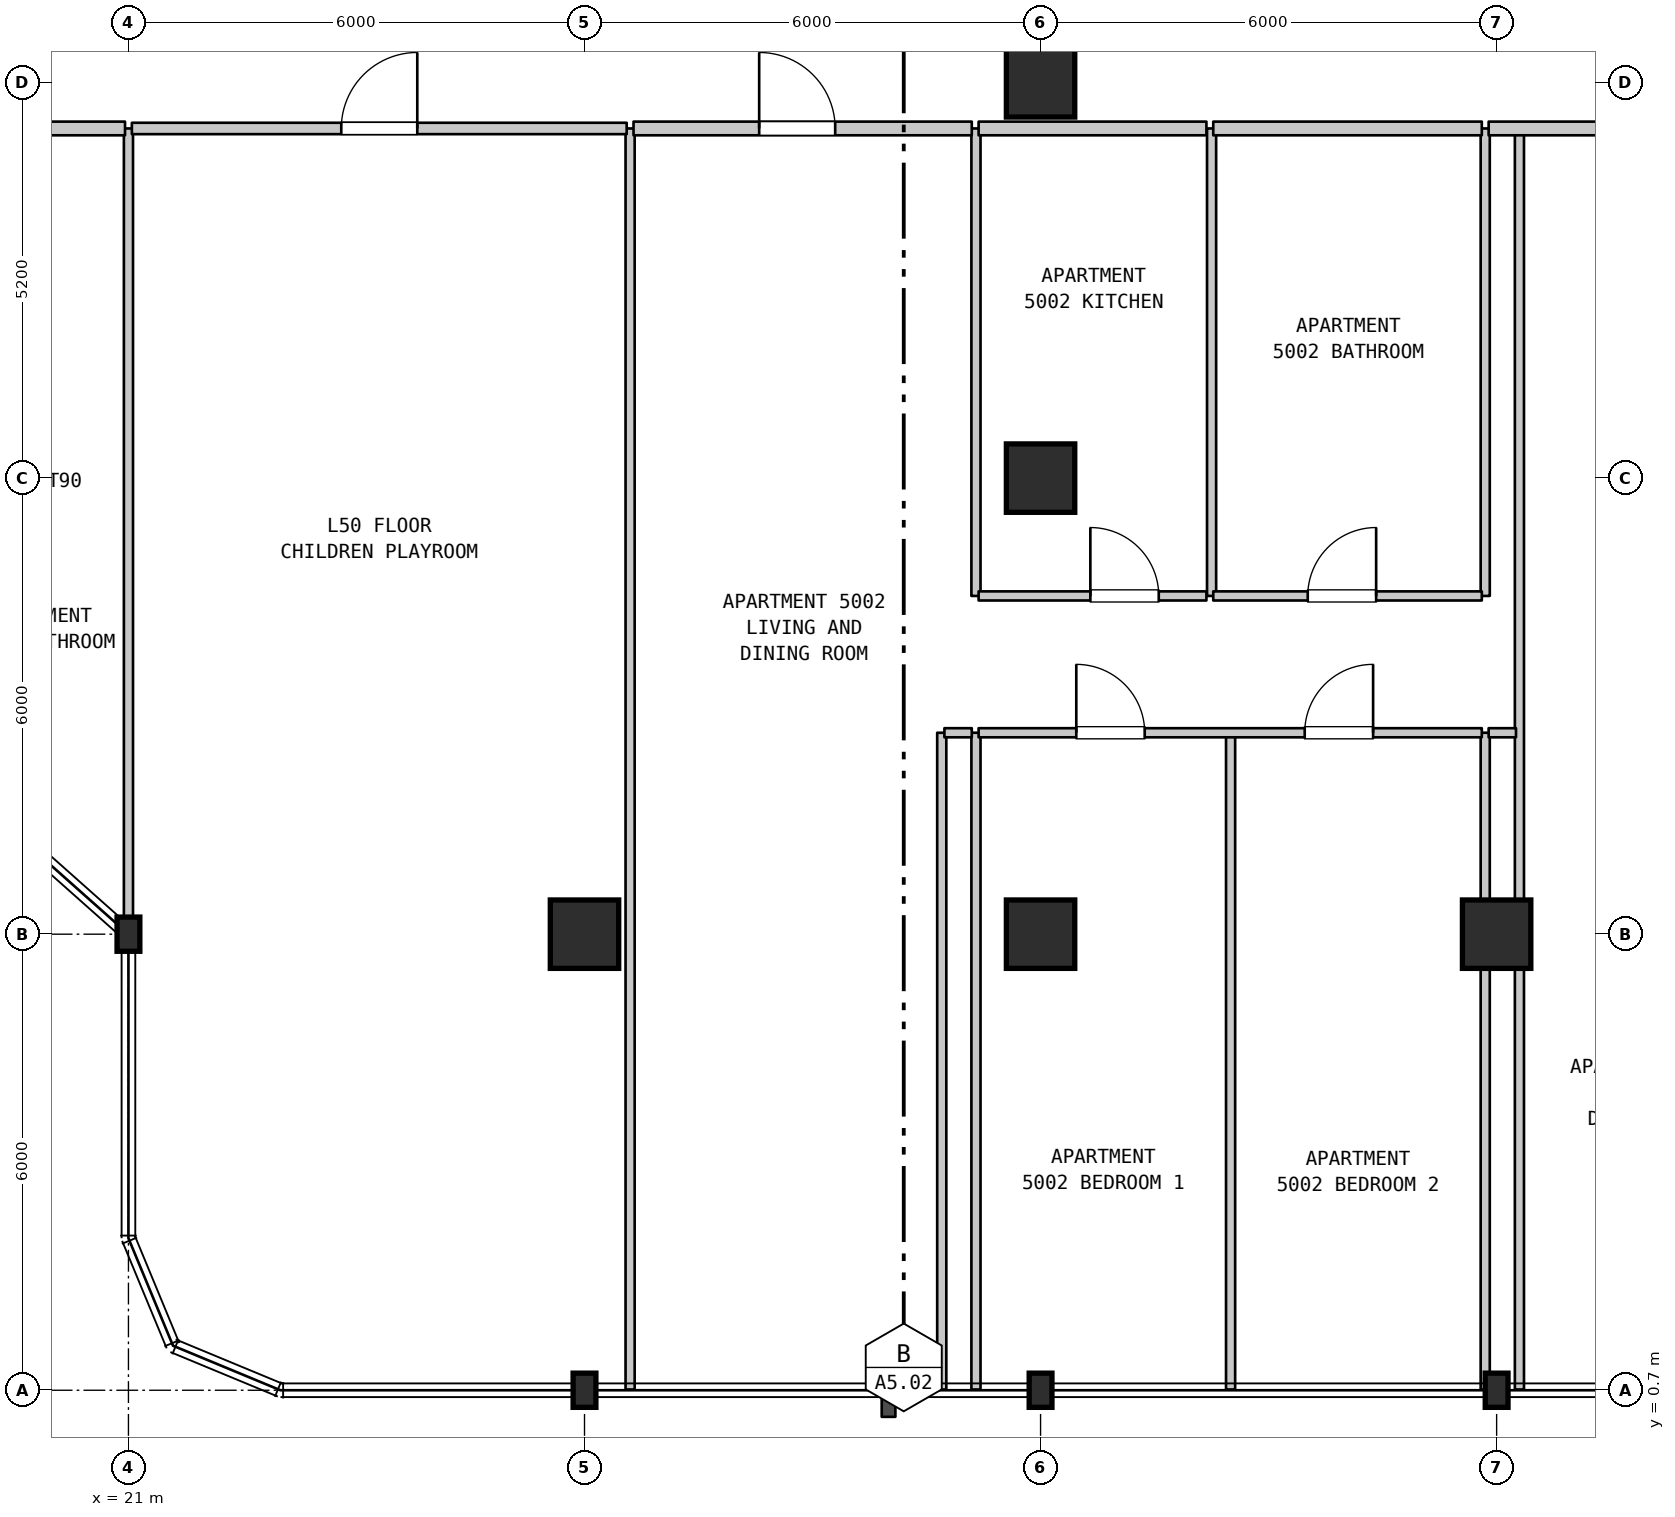
"""IFC4 building model, lengths in metres.
Left out: names, types, materials, properties, quantities, classifications, styles, units other than length and angle.
Written with IfcOpenShell. Run it as: python <this file> out.ifc"""

import sys

from ifc_helpers import new_model, si_unit, direction, frame, frame_2d, origin, origin_2d, place, context, subcontext, project, spatial, rectangle, i_section, extrude, element, fill, save


model = new_model("IFC4")
c1 = context("Model", 3, precision=1e-05, world=origin(), true_north=direction((0.0, 1.0)))
c2 = subcontext(c1, "Body", "Model", "MODEL_VIEW")
j1 = project(units=[si_unit("LENGTHUNIT", "METRE"), si_unit("PLANEANGLEUNIT", "RADIAN")], contexts=[c1])
p1 = place(None, origin())
s1 = spatial("IfcSite", under=j1, at=p1, CompositionType="ELEMENT")
p2 = place(p1, origin())
s2 = spatial("IfcBuilding", under=s1, at=p2, CompositionType="ELEMENT")
p3 = place(p2, frame((0.0, 0.0, 203.2)))
s3 = spatial("IfcBuildingStorey", under=s2, at=p3, CompositionType="ELEMENT", Elevation=203.2)
for number, where, z_axis, x_axis in (
    (1, (21.0, 6.7, 0.0), (0.0, 0.0, 1.0), (1.0, 0.0, 0.0)),
    (2, (27.0, 0.7, 0.0), (0.0, 0.0, 1.0), (1.0, 0.0, 0.0)),
):
    element("IfcColumn", number, at=place(p3, frame(where, z_axis=z_axis, x_axis=x_axis)), inside=s3, PredefinedType="COLUMN", context=c2, shape_type="SweptSolid", body=[
        extrude(i_section(OverallWidth=0.3, OverallDepth=0.45, WebThickness=0.014, FlangeThickness=0.026, FilletRadius=0.027, at=origin_2d()), origin(), (0.0, 0.0, 1.0), 3.7),
    ])
p4 = place(p3, frame((27.0, 6.7, 0.0), z_axis=(0.0, 0.0, 1.0), x_axis=(1.0, 0.0, 0.0)))
e3 = element("IfcColumn", 3, at=p4, inside=s3, PredefinedType="COLUMN", context=c2, shape_type="SweptSolid", body=[
    extrude(rectangle(XDim=0.9, YDim=0.9, at=origin_2d()), origin(), (0.0, 0.0, 1.0), 3.7),
])
p5 = place(p3, frame((33.0, 0.7, 0.0), z_axis=(0.0, 0.0, 1.0), x_axis=(1.0, 0.0, 0.0)))
e4 = element("IfcColumn", 4, at=p5, inside=s3, PredefinedType="COLUMN", context=c2, shape_type="SweptSolid", body=[
    extrude(i_section(OverallWidth=0.3, OverallDepth=0.45, WebThickness=0.014, FlangeThickness=0.026, FilletRadius=0.027, at=origin_2d()), origin(), (0.0, 0.0, 1.0), 3.7),
])
for number, where, z_axis, x_axis in (
    (5, (33.0, 6.7, 0.0), (0.0, 0.0, 1.0), (1.0, 0.0, 0.0)),
    (6, (33.0, 12.7, 0.0), (0.0, 0.0, 1.0), (1.0, 0.0, 0.0)),
    (7, (33.0, 17.9, 0.0), (0.0, 0.0, 1.0), (1.0, 0.0, 0.0)),
):
    element("IfcColumn", number, at=place(p3, frame(where, z_axis=z_axis, x_axis=x_axis)), inside=s3, PredefinedType="COLUMN", context=c2, shape_type="SweptSolid", body=[
        extrude(rectangle(XDim=0.9, YDim=0.9, at=origin_2d()), origin(), (0.0, 0.0, 1.0), 3.7),
    ])
p6 = place(p3, frame((39.0, 0.7, 0.0), z_axis=(0.0, 0.0, 1.0), x_axis=(1.0, 0.0, 0.0)))
e8 = element("IfcColumn", 8, at=p6, inside=s3, PredefinedType="COLUMN", context=c2, shape_type="SweptSolid", body=[
    extrude(i_section(OverallWidth=0.3, OverallDepth=0.45, WebThickness=0.014, FlangeThickness=0.026, FilletRadius=0.027, at=origin_2d()), origin(), (0.0, 0.0, 1.0), 3.7),
])
p7 = place(p3, frame((39.0, 6.7, 0.0), z_axis=(0.0, 0.0, 1.0), x_axis=(1.0, 0.0, 0.0)))
e9 = element("IfcColumn", 9, at=p7, inside=s3, PredefinedType="COLUMN", context=c2, shape_type="SweptSolid", body=[
    extrude(rectangle(XDim=0.9, YDim=0.9, at=origin_2d()), origin(), (0.0, 0.0, 1.0), 3.7),
])
p8 = place(p3, frame((21.0, 6.71, 0.0), z_axis=(0.0, 0.0, 1.0), x_axis=(0.0, 1.0, 0.0)))
e10 = element("IfcWall", 10, at=p8, inside=s3, PredefinedType="PARTITIONING", context=c2, shape_type="SweptSolid", body=[
    extrude(rectangle(XDim=10.59, YDim=0.12, at=frame_2d((5.295, 0.0))), origin(), (0.0, 0.0, 1.0), 3.39),
])
p9 = place(p3, frame((27.6, 0.71, 0.0), z_axis=(0.0, 0.0, 1.0), x_axis=(0.0, 1.0, 0.0)))
e11 = element("IfcWall", 11, at=p9, inside=s3, PredefinedType="PARTITIONING", context=c2, shape_type="SweptSolid", body=[
    extrude(rectangle(XDim=16.59, YDim=0.12, at=frame_2d((8.295, 0.0))), origin(), (0.0, 0.0, 1.0), 3.39),
])
for number, where, z_axis, x_axis in (
    (12, (31.7, 0.71, 0.0), (0.0, 0.0, 1.0), (0.0, 1.0, 0.0)),
    (13, (32.15, 0.71, 0.0), (0.0, 0.0, 1.0), (0.0, 1.0, 0.0)),
):
    element("IfcWall", number, at=place(p3, frame(where, z_axis=z_axis, x_axis=x_axis)), inside=s3, PredefinedType="PARTITIONING", context=c2, shape_type="SweptSolid", body=[
        extrude(rectangle(XDim=8.64, YDim=0.12, at=frame_2d((4.32, 0.0))), origin(), (0.0, 0.0, 1.0), 3.39),
    ])
for number, where, z_axis, x_axis in (
    (14, (32.15, 11.15, 0.0), (0.0, 0.0, 1.0), (0.0, 1.0, 0.0)),
    (15, (35.25, 11.15, 0.0), (0.0, 0.0, 1.0), (0.0, 1.0, 0.0)),
):
    element("IfcWall", number, at=place(p3, frame(where, z_axis=z_axis, x_axis=x_axis)), inside=s3, PredefinedType="PARTITIONING", context=c2, shape_type="SweptSolid", body=[
        extrude(rectangle(XDim=6.15, YDim=0.12, at=frame_2d((3.075, 0.0))), origin(), (0.0, 0.0, 1.0), 3.39),
    ])
for number, where, z_axis, x_axis in (
    (16, (35.5, 0.71, 0.0), (0.0, 0.0, 1.0), (0.0, 1.0, 0.0)),
    (17, (38.85, 0.71, 0.0), (0.0, 0.0, 1.0), (0.0, 1.0, 0.0)),
):
    element("IfcWall", number, at=place(p3, frame(where, z_axis=z_axis, x_axis=x_axis)), inside=s3, PredefinedType="PARTITIONING", context=c2, shape_type="SweptSolid", body=[
        extrude(rectangle(XDim=8.64, YDim=0.12, at=frame_2d((4.32, 0.0))), origin(), (0.0, 0.0, 1.0), 3.39),
    ])
p10 = place(p3, frame((38.85, 11.15, 0.0), z_axis=(0.0, 0.0, 1.0), x_axis=(0.0, 1.0, 0.0)))
e18 = element("IfcWall", 18, at=p10, inside=s3, PredefinedType="PARTITIONING", context=c2, shape_type="SweptSolid", body=[
    extrude(rectangle(XDim=6.15, YDim=0.12, at=frame_2d((3.075, 0.0))), origin(), (0.0, 0.0, 1.0), 3.39),
])
p11 = place(p3, frame((39.3, 0.71, 0.0), z_axis=(0.0, 0.0, 1.0), x_axis=(0.0, 1.0, 0.0)))
e19 = element("IfcWall", 19, at=p11, inside=s3, PredefinedType="PARTITIONING", context=c2, shape_type="SweptSolid", body=[
    extrude(rectangle(XDim=16.59, YDim=0.12, at=frame_2d((8.295, 0.0))), origin(), (0.0, 0.0, 1.0), 3.39),
])
p12 = place(p3, frame((31.735, 9.35, 0.0), z_axis=(0.0, 0.0, 1.0), x_axis=(1.0, 0.0, 0.0)))
e20 = element("IfcWall", 20, at=p12, inside=s3, PredefinedType="PARTITIONING", context=c2, shape_type="SweptSolid", body=[
    extrude(rectangle(XDim=0.36, YDim=0.12, at=frame_2d((0.18, 0.0))), origin(), (0.0, 0.0, 1.0), 3.39),
])
p13 = place(p3, frame((32.185, 9.35, 0.0), z_axis=(0.0, 0.0, 1.0), x_axis=(1.0, 0.0, 0.0)))
e21 = element("IfcWall", 21, at=p13, inside=s3, PredefinedType="PARTITIONING", context=c2, shape_type="SweptSolid", body=[
    extrude(rectangle(XDim=6.62, YDim=0.12, at=frame_2d((3.31, 0.0))), origin(), (0.0, 0.0, 1.0), 3.39),
])
p14 = place(p13, frame((1.285, 0.0, 0.0)))
e22 = element("IfcOpeningElement", 22, at=p14, cuts=e21, PredefinedType="OPENING", context=c2, shape_type="SweptSolid", body=[
    extrude(rectangle(XDim=0.9, YDim=2.15, at=frame_2d((0.45, 1.075))), frame((0.0, 0.07, 0.0), z_axis=(0.0, -1.0, 0.0), x_axis=(1.0, 0.0, 0.0)), (0.0, 0.0, 1.0), 0.14),
])
p15 = place(p13, frame((4.29, 0.0, 0.0)))
e23 = element("IfcOpeningElement", 23, at=p15, cuts=e21, PredefinedType="OPENING", context=c2, shape_type="SweptSolid", body=[
    extrude(rectangle(XDim=0.9, YDim=2.15, at=frame_2d((0.45, 1.075))), frame((0.0, 0.07, 0.0), z_axis=(0.0, -1.0, 0.0), x_axis=(1.0, 0.0, 0.0)), (0.0, 0.0, 1.0), 0.14),
])
p16 = place(p3, frame((38.895, 9.35, 0.0), z_axis=(0.0, 0.0, 1.0), x_axis=(1.0, 0.0, 0.0)))
e24 = element("IfcWall", 24, at=p16, inside=s3, PredefinedType="PARTITIONING", context=c2, shape_type="SweptSolid", body=[
    extrude(rectangle(XDim=0.36, YDim=0.12, at=frame_2d((0.18, 0.0))), origin(), (0.0, 0.0, 1.0), 3.39),
])
p17 = place(p3, frame((32.185, 11.15, 0.0), z_axis=(0.0, 0.0, 1.0), x_axis=(1.0, 0.0, 0.0)))
e25 = element("IfcWall", 25, at=p17, inside=s3, PredefinedType="PARTITIONING", context=c2, shape_type="SweptSolid", body=[
    extrude(rectangle(XDim=2.997, YDim=0.12, at=frame_2d((1.499, 0.0))), origin(), (0.0, 0.0, 1.0), 3.39),
])
p18 = place(p17, frame((1.47, 0.0, 0.0)))
e26 = element("IfcOpeningElement", 26, at=p18, cuts=e25, PredefinedType="OPENING", context=c2, shape_type="SweptSolid", body=[
    extrude(rectangle(XDim=0.9, YDim=2.15, at=frame_2d((0.45, 1.075))), frame((0.0, 0.07, 0.0), z_axis=(0.0, -1.0, 0.0), x_axis=(1.0, 0.0, 0.0)), (0.0, 0.0, 1.0), 0.14),
])
p19 = place(p3, frame((35.272, 11.15, 0.0), z_axis=(0.0, 0.0, 1.0), x_axis=(1.0, 0.0, 0.0)))
e27 = element("IfcWall", 27, at=p19, inside=s3, PredefinedType="PARTITIONING", context=c2, shape_type="SweptSolid", body=[
    extrude(rectangle(XDim=3.533, YDim=0.12, at=frame_2d((1.767, 0.0))), origin(), (0.0, 0.0, 1.0), 3.39),
])
p20 = place(p19, frame((1.243, 0.0, 0.0)))
e28 = element("IfcOpeningElement", 28, at=p20, cuts=e27, PredefinedType="OPENING", context=c2, shape_type="SweptSolid", body=[
    extrude(rectangle(XDim=0.9, YDim=2.1, at=frame_2d((0.45, 1.05))), frame((0.0, 0.07, 0.0), z_axis=(0.0, -1.0, 0.0), x_axis=(1.0, 0.0, 0.0)), (0.0, 0.0, 1.0), 0.14),
])
p21 = place(p3, frame((19.095, 17.3, 0.0), z_axis=(0.0, 0.0, 1.0), x_axis=(1.0, 0.0, 0.0)))
e29 = element("IfcWall", 29, at=p21, inside=s3, PredefinedType="STANDARD", context=c2, shape_type="SweptSolid", body=[
    extrude(rectangle(XDim=1.86, YDim=0.18, at=frame_2d((0.93, 0.0))), origin(), (0.0, 0.0, 1.0), 3.39),
])
p22 = place(p3, frame((21.045, 17.3, 0.0), z_axis=(0.0, 0.0, 1.0), x_axis=(1.0, 0.0, 0.0)))
e30 = element("IfcWall", 30, at=p22, inside=s3, PredefinedType="STANDARD", context=c2, shape_type="SweptSolid", body=[
    extrude(rectangle(XDim=6.51, YDim=0.15, at=frame_2d((3.255, 0.0))), origin(), (0.0, 0.0, 1.0), 3.39),
])
p23 = place(p22, frame((2.755, 0.0, 0.0)))
e31 = element("IfcOpeningElement", 31, at=p23, cuts=e30, PredefinedType="OPENING", context=c2, shape_type="SweptSolid", body=[
    extrude(rectangle(XDim=1.0, YDim=2.15, at=frame_2d((0.5, 1.075))), frame((0.0, 0.085, 0.0), z_axis=(0.0, -1.0, 0.0), x_axis=(1.0, 0.0, 0.0)), (0.0, 0.0, 1.0), 0.17),
])
p24 = place(p3, frame((27.645, 17.3, 0.0), z_axis=(0.0, 0.0, 1.0), x_axis=(1.0, 0.0, 0.0)))
e32 = element("IfcWall", 32, at=p24, inside=s3, PredefinedType="STANDARD", context=c2, shape_type="SweptSolid", body=[
    extrude(rectangle(XDim=4.45, YDim=0.18, at=frame_2d((2.225, 0.0))), origin(), (0.0, 0.0, 1.0), 3.39),
])
p25 = place(p24, frame((1.653, 0.0, 0.0)))
e33 = element("IfcOpeningElement", 33, at=p25, cuts=e32, PredefinedType="OPENING", context=c2, shape_type="SweptSolid", body=[
    extrude(rectangle(XDim=1.0, YDim=2.15, at=frame_2d((0.5, 1.075))), frame((0.0, 0.1, 0.0), z_axis=(0.0, -1.0, 0.0), x_axis=(1.0, 0.0, 0.0)), (0.0, 0.0, 1.0), 0.2),
])
p26 = place(p3, frame((32.185, 17.3, 0.0), z_axis=(0.0, 0.0, 1.0), x_axis=(1.0, 0.0, 0.0)))
e34 = element("IfcWall", 34, at=p26, inside=s3, PredefinedType="STANDARD", context=c2, shape_type="SweptSolid", body=[
    extrude(rectangle(XDim=2.997, YDim=0.18, at=frame_2d((1.499, 0.0))), origin(), (0.0, 0.0, 1.0), 3.39),
])
p27 = place(p3, frame((35.272, 17.3, 0.0), z_axis=(0.0, 0.0, 1.0), x_axis=(1.0, 0.0, 0.0)))
e35 = element("IfcWall", 35, at=p27, inside=s3, PredefinedType="STANDARD", context=c2, shape_type="SweptSolid", body=[
    extrude(rectangle(XDim=3.533, YDim=0.18, at=frame_2d((1.767, 0.0))), origin(), (0.0, 0.0, 1.0), 3.39),
])
p28 = place(p3, frame((38.895, 17.3, 0.0), z_axis=(0.0, 0.0, 1.0), x_axis=(1.0, 0.0, 0.0)))
e36 = element("IfcWall", 36, at=p28, inside=s3, PredefinedType="STANDARD", context=c2, shape_type="SweptSolid", body=[
    extrude(rectangle(XDim=3.96, YDim=0.18, at=frame_2d((1.98, 0.0))), origin(), (0.0, 0.0, 1.0), 3.39),
])
p29 = place(p28, frame((1.609, 0.0, 0.0)))
e37 = element("IfcOpeningElement", 37, at=p29, cuts=e36, PredefinedType="OPENING", context=c2, shape_type="SweptSolid", body=[
    extrude(rectangle(XDim=1.0, YDim=2.15, at=frame_2d((0.5, 1.075))), frame((0.0, 0.1, 0.0), z_axis=(0.0, -1.0, 0.0), x_axis=(1.0, 0.0, 0.0)), (0.0, 0.0, 1.0), 0.2),
])
p30 = place(p14, origin())
e38 = element("IfcDoor", 38, at=p30, inside=s3, OperationType="SINGLE_SWING_LEFT", PredefinedType="DOOR", context=c2, shape_type="SweptSolid", body=[
    extrude(rectangle(XDim=0.9, YDim=2.15, at=frame_2d((0.45, 1.075))), frame((0.0, 0.025, 0.0), z_axis=(0.0, -1.0, 0.0), x_axis=(1.0, 0.0, 0.0)), (0.0, 0.0, 1.0), 0.05),
])
fill(e22, e38)
p31 = place(p15, origin())
e39 = element("IfcDoor", 39, at=p31, inside=s3, OperationType="SINGLE_SWING_RIGHT", PredefinedType="DOOR", context=c2, shape_type="SweptSolid", body=[
    extrude(rectangle(XDim=0.9, YDim=2.15, at=frame_2d((0.45, 1.075))), frame((0.0, 0.025, 0.0), z_axis=(0.0, -1.0, 0.0), x_axis=(1.0, 0.0, 0.0)), (0.0, 0.0, 1.0), 0.05),
])
fill(e23, e39)
p32 = place(p18, origin())
e40 = element("IfcDoor", 40, at=p32, inside=s3, OperationType="SINGLE_SWING_LEFT", PredefinedType="DOOR", context=c2, shape_type="SweptSolid", body=[
    extrude(rectangle(XDim=0.9, YDim=2.15, at=frame_2d((0.45, 1.075))), frame((0.0, 0.025, 0.0), z_axis=(0.0, -1.0, 0.0), x_axis=(1.0, 0.0, 0.0)), (0.0, 0.0, 1.0), 0.05),
])
fill(e26, e40)
p33 = place(p20, origin())
e41 = element("IfcDoor", 41, at=p33, inside=s3, OperationType="SINGLE_SWING_RIGHT", PredefinedType="DOOR", context=c2, shape_type="SweptSolid", body=[
    extrude(rectangle(XDim=0.9, YDim=2.1, at=frame_2d((0.45, 1.05))), frame((0.0, 0.025, 0.0), z_axis=(0.0, -1.0, 0.0), x_axis=(1.0, 0.0, 0.0)), (0.0, 0.0, 1.0), 0.05),
])
fill(e28, e41)
p34 = place(p23, origin())
e42 = element("IfcDoor", 42, at=p34, inside=s3, OperationType="SINGLE_SWING_RIGHT", PredefinedType="DOOR", context=c2, shape_type="SweptSolid", body=[
    extrude(rectangle(XDim=1.0, YDim=2.15, at=frame_2d((0.5, 1.075))), frame((0.0, 0.025, 0.0), z_axis=(0.0, -1.0, 0.0), x_axis=(1.0, 0.0, 0.0)), (0.0, 0.0, 1.0), 0.05),
])
fill(e31, e42)
p35 = place(p25, origin())
e43 = element("IfcDoor", 43, at=p35, inside=s3, OperationType="SINGLE_SWING_LEFT", PredefinedType="DOOR", context=c2, shape_type="SweptSolid", body=[
    extrude(rectangle(XDim=1.0, YDim=2.15, at=frame_2d((0.5, 1.075))), frame((0.0, 0.025, 0.0), z_axis=(0.0, -1.0, 0.0), x_axis=(1.0, 0.0, 0.0)), (0.0, 0.0, 1.0), 0.05),
])
fill(e33, e43)
save(model, sys.argv[1])
